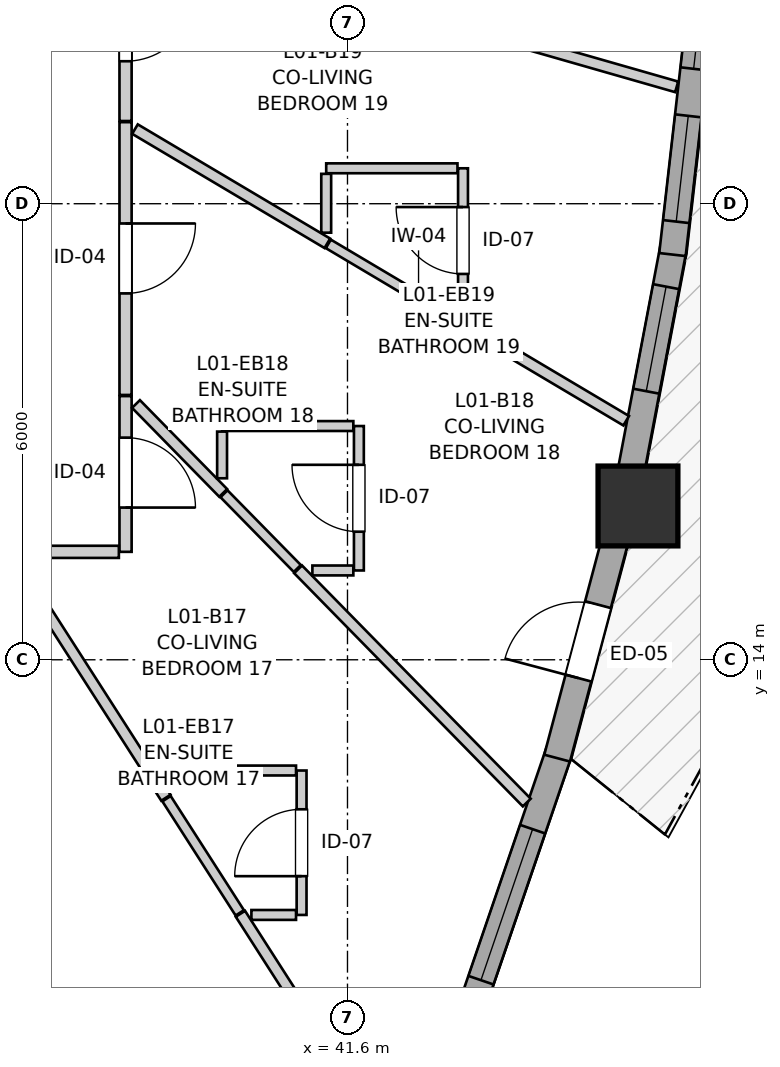
"""IFC4 building model, lengths in metres.
Left out: names, types, materials, properties, quantities, classifications, styles, units other than length and angle.
Written with IfcOpenShell. Run it as: python <this file> out.ifc"""

import sys

from ifc_helpers import new_model, si_unit, direction, frame, frame_2d, origin, origin_2d, place, context, subcontext, project, spatial, rectangle, extrude, source, transform, mapped, element, fill, save


model = new_model("IFC4")
c1 = context("Model", 3, precision=1e-05, world=origin(), true_north=direction((0.0, 1.0)))
c2 = subcontext(c1, "Body", "Model", "MODEL_VIEW")
j1 = project(units=[si_unit("LENGTHUNIT", "METRE"), si_unit("PLANEANGLEUNIT", "RADIAN")], contexts=[c1])
p1 = place(None, origin())
s1 = spatial("IfcSite", under=j1, at=p1, CompositionType="ELEMENT")
p2 = place(p1, origin())
s2 = spatial("IfcBuilding", under=s1, at=p2, CompositionType="ELEMENT")
p3 = place(p2, frame((0.0, 0.0, 7.8)))
s3 = spatial("IfcBuildingStorey", under=s2, at=p3, CompositionType="ELEMENT", Elevation=7.8)
m1 = source(origin(), c2, "Body", "SweptSolid", [
    extrude(rectangle(XDim=1.05, YDim=1.05, at=origin_2d()), origin(), (0.0, 0.0, 1.0), 2.94),
])
p4 = place(p3, frame((45.422, 16.023, 0.0), z_axis=(0.0, 0.0, 1.0), x_axis=(1.0, 0.0, 0.0)))
e1 = element("IfcColumn", 1, at=p4, inside=s3, PredefinedType="COLUMN", context=c2, shape_type="MappedRepresentation", body=[
    mapped(m1, transform((0.0, 0.0, 0.0), x_axis=(1.0, 0.0, 0.0), y_axis=(0.0, 1.0, 0.0), z_axis=(0.0, 0.0, 1.0), scale=1.0)),
])
p5 = place(p3, frame((43.241, 9.448, 0.0), z_axis=(0.0, 0.0, 1.0), x_axis=(0.323599751171, 0.946194060984, 0.0)))
e2 = element("IfcWall", 2, at=p5, inside=s3, PredefinedType="SOLIDWALL", context=c2, shape_type="SweptSolid", body=[
    extrude(rectangle(XDim=3.532, YDim=0.35, at=frame_2d((1.766, 0.0))), origin(), (0.0, 0.0, 1.0), 2.42),
])
p6 = place(p5, frame((0.356, 0.0, 0.82)))
e3 = element("IfcOpeningElement", 3, at=p6, cuts=e2, PredefinedType="OPENING", context=c2, shape_type="SweptSolid", body=[
    extrude(rectangle(XDim=2.1, YDim=1.4, at=frame_2d((1.05, 0.7))), frame((0.0, 0.185, 0.0), z_axis=(0.0, -1.0, 0.0), x_axis=(1.0, 0.0, 0.0)), (0.0, 0.0, 1.0), 0.37),
])
p7 = place(p3, frame((44.358, 12.706, 0.0), z_axis=(0.0, 0.0, 1.0), x_axis=(0.25708907847, 0.966387709841, 0.0)))
e4 = element("IfcWall", 4, at=p7, inside=s3, PredefinedType="SOLIDWALL", context=c2, shape_type="SweptSolid", body=[
    extrude(rectangle(XDim=3.179, YDim=0.35, at=frame_2d((1.59, 0.0))), origin(), (0.0, 0.0, 1.0), 2.42),
])
p8 = place(p7, frame((1.09, 0.0, 0.0)))
e5 = element("IfcOpeningElement", 5, at=p8, cuts=e4, PredefinedType="OPENING", context=c2, shape_type="SweptSolid", body=[
    extrude(rectangle(XDim=1.0, YDim=2.1, at=frame_2d((0.5, 1.05))), frame((0.0, 0.185, 0.0), z_axis=(0.0, -1.0, 0.0), x_axis=(1.0, 0.0, 0.0)), (0.0, 0.0, 1.0), 0.37),
])
p9 = place(p3, frame((45.306, 16.351, 0.0), z_axis=(0.0, 0.0, 1.0), x_axis=(0.186681017514, 0.982420580861, 0.0)))
e6 = element("IfcWall", 6, at=p9, inside=s3, PredefinedType="SOLIDWALL", context=c2, shape_type="SweptSolid", body=[
    extrude(rectangle(XDim=3.123, YDim=0.35, at=frame_2d((1.562, 0.0))), origin(), (0.0, 0.0, 1.0), 2.42),
])
p10 = place(p9, frame((1.204, 0.0, 0.82)))
e7 = element("IfcOpeningElement", 7, at=p10, cuts=e6, PredefinedType="OPENING", context=c2, shape_type="SweptSolid", body=[
    extrude(rectangle(XDim=1.4, YDim=1.35, at=frame_2d((0.7, 0.675))), frame((0.0, 0.185, 0.0), z_axis=(0.0, -1.0, 0.0), x_axis=(1.0, 0.0, 0.0)), (0.0, 0.0, 1.0), 0.37),
])
p11 = place(p3, frame((45.875, 19.331, 0.0), z_axis=(0.0, 0.0, 1.0), x_axis=(0.113329685842, 0.99355743785, 0.0)))
e8 = element("IfcWall", 8, at=p11, inside=s3, PredefinedType="SOLIDWALL", context=c2, shape_type="SweptSolid", body=[
    extrude(rectangle(XDim=3.365, YDim=0.35, at=frame_2d((1.683, 0.0))), origin(), (0.0, 0.0, 1.0), 2.42),
])
p12 = place(p11, frame((0.437, 0.0, 0.82)))
e9 = element("IfcOpeningElement", 9, at=p12, cuts=e8, PredefinedType="OPENING", context=c2, shape_type="SweptSolid", body=[
    extrude(rectangle(XDim=1.4, YDim=1.35, at=frame_2d((0.7, 0.675))), frame((0.0, 0.185, 0.0), z_axis=(0.0, -1.0, 0.0), x_axis=(1.0, 0.0, 0.0)), (0.0, 0.0, 1.0), 0.37),
])
p13 = place(p11, frame((2.459, 0.0, 0.82)))
e10 = element("IfcOpeningElement", 10, at=p13, cuts=e8, PredefinedType="OPENING", context=c2, shape_type="SweptSolid", body=[
    extrude(rectangle(XDim=0.58, YDim=1.35, at=frame_2d((0.29, 0.675))), frame((0.0, 0.185, 0.0), z_axis=(0.0, -1.0, 0.0), x_axis=(1.0, 0.0, 0.0)), (0.0, 0.0, 1.0), 0.37),
])
p14 = place(p3, frame((38.68, 21.073, 0.0), z_axis=(0.0, 0.0, 1.0), x_axis=(0.0, -1.0, 0.0)))
e11 = element("IfcWall", 11, at=p14, inside=s3, PredefinedType="PARTITIONING", context=c2, shape_type="SweptSolid", body=[
    extrude(rectangle(XDim=3.589, YDim=0.16, at=frame_2d((1.794, 0.0))), origin(), (0.0, 0.0, 1.0), 2.94),
])
p15 = place(p14, frame((1.333, 0.0, 0.0)))
e12 = element("IfcOpeningElement", 12, at=p15, cuts=e11, PredefinedType="OPENING", context=c2, shape_type="SweptSolid", body=[
    extrude(rectangle(XDim=0.92, YDim=2.1, at=frame_2d((0.46, 1.05))), frame((0.0, 0.09, 0.0), z_axis=(0.0, -1.0, 0.0), x_axis=(1.0, 0.0, 0.0)), (0.0, 0.0, 1.0), 0.18),
])
p16 = place(p3, frame((38.68, 23.63, 0.0), z_axis=(0.0, 0.0, 1.0), x_axis=(0.0, -1.0, 0.0)))
e13 = element("IfcWall", 13, at=p16, inside=s3, PredefinedType="PARTITIONING", context=c2, shape_type="SweptSolid", body=[
    extrude(rectangle(XDim=2.542, YDim=0.16, at=frame_2d((1.271, 0.0))), origin(), (0.0, 0.0, 1.0), 2.94),
])
p17 = place(p16, frame((0.835, 0.0, 0.0)))
e14 = element("IfcOpeningElement", 14, at=p17, cuts=e13, PredefinedType="OPENING", context=c2, shape_type="SweptSolid", body=[
    extrude(rectangle(XDim=0.92, YDim=2.1, at=frame_2d((0.46, 1.05))), frame((0.0, 0.09, 0.0), z_axis=(0.0, -1.0, 0.0), x_axis=(1.0, 0.0, 0.0)), (0.0, 0.0, 1.0), 0.18),
])
p18 = place(p3, frame((38.68, 17.469, 0.0), z_axis=(0.0, 0.0, 1.0), x_axis=(0.0, -1.0, 0.0)))
e15 = element("IfcWall", 15, at=p18, inside=s3, PredefinedType="PARTITIONING", context=c2, shape_type="SweptSolid", body=[
    extrude(rectangle(XDim=2.049, YDim=0.16, at=frame_2d((1.024, 0.0))), origin(), (0.0, 0.0, 1.0), 2.94),
])
p19 = place(p18, frame((0.546, 0.0, 0.0)))
e16 = element("IfcOpeningElement", 16, at=p19, cuts=e15, PredefinedType="OPENING", context=c2, shape_type="SweptSolid", body=[
    extrude(rectangle(XDim=0.92, YDim=2.1, at=frame_2d((0.46, 1.05))), frame((0.0, 0.09, 0.0), z_axis=(0.0, -1.0, 0.0), x_axis=(1.0, 0.0, 0.0)), (0.0, 0.0, 1.0), 0.18),
])
p20 = place(p3, frame((43.12, 18.566, 0.0), z_axis=(0.0, 0.0, 1.0), x_axis=(0.0, 1.0, 0.0)))
e17 = element("IfcWall", 17, at=p20, inside=s3, PredefinedType="PARTITIONING", context=c2, shape_type="SweptSolid", body=[
    extrude(rectangle(XDim=1.9, YDim=0.13, at=frame_2d((0.95, 0.0))), origin(), (0.0, 0.0, 1.0), 2.94),
])
p21 = place(p20, frame((0.51, 0.0, 0.0)))
e18 = element("IfcOpeningElement", 18, at=p21, cuts=e17, PredefinedType="OPENING", context=c2, shape_type="SweptSolid", body=[
    extrude(rectangle(XDim=0.88, YDim=2.05, at=frame_2d((0.44, 1.025))), frame((0.0, 0.075, 0.0), z_axis=(0.0, -1.0, 0.0), x_axis=(1.0, 0.0, 0.0)), (0.0, 0.0, 1.0), 0.15),
])
p22 = place(p3, frame((40.996, 10.643, 0.0), z_axis=(0.0, 0.0, 1.0), x_axis=(0.0, 1.0, 0.0)))
e19 = element("IfcWall", 19, at=p22, inside=s3, PredefinedType="PARTITIONING", context=c2, shape_type="SweptSolid", body=[
    extrude(rectangle(XDim=1.9, YDim=0.13, at=frame_2d((0.95, 0.0))), origin(), (0.0, 0.0, 1.0), 2.94),
])
p23 = place(p22, frame((0.51, 0.0, 0.0)))
e20 = element("IfcOpeningElement", 20, at=p23, cuts=e19, PredefinedType="OPENING", context=c2, shape_type="SweptSolid", body=[
    extrude(rectangle(XDim=0.88, YDim=2.05, at=frame_2d((0.44, 1.025))), frame((0.0, 0.075, 0.0), z_axis=(0.0, -1.0, 0.0), x_axis=(1.0, 0.0, 0.0)), (0.0, 0.0, 1.0), 0.15),
])
p24 = place(p3, frame((41.75, 15.175, 0.0), z_axis=(0.0, 0.0, 1.0), x_axis=(0.0, 1.0, 0.0)))
e21 = element("IfcWall", 21, at=p24, inside=s3, PredefinedType="PARTITIONING", context=c2, shape_type="SweptSolid", body=[
    extrude(rectangle(XDim=1.9, YDim=0.13, at=frame_2d((0.95, 0.0))), origin(), (0.0, 0.0, 1.0), 2.94),
])
p25 = place(p24, frame((0.51, 0.0, 0.0)))
e22 = element("IfcOpeningElement", 22, at=p25, cuts=e21, PredefinedType="OPENING", context=c2, shape_type="SweptSolid", body=[
    extrude(rectangle(XDim=0.88, YDim=2.05, at=frame_2d((0.44, 1.025))), frame((0.0, 0.075, 0.0), z_axis=(0.0, -1.0, 0.0), x_axis=(1.0, 0.0, 0.0)), (0.0, 0.0, 1.0), 0.15),
])
p26 = place(p3, frame((40.95, 15.19, 0.0), z_axis=(0.0, 0.0, 1.0), x_axis=(0.700142401903, -0.714003233226, 0.0)))
e23 = element("IfcWall", 23, at=p26, inside=s3, PredefinedType="PARTITIONING", context=c2, shape_type="SweptSolid", body=[
    extrude(rectangle(XDim=4.298, YDim=0.145, at=frame_2d((2.149, 0.0))), origin(), (0.0, 0.0, 1.0), 2.94),
])
p27 = place(p3, frame((40.191, 10.658, 0.0), z_axis=(0.0, 0.0, 1.0), x_axis=(0.539757550566, -0.841820519236, 0.0)))
e24 = element("IfcWall", 24, at=p27, inside=s3, PredefinedType="PARTITIONING", context=c2, shape_type="SweptSolid", body=[
    extrude(rectangle(XDim=4.221, YDim=0.145, at=frame_2d((2.111, 0.0))), origin(), (0.0, 0.0, 1.0), 2.94),
])
p28 = place(p3, frame((37.217, 15.294, 0.0), z_axis=(0.0, 0.0, 1.0), x_axis=(0.539878709929, -0.841742822105, 0.0)))
e25 = element("IfcWall", 25, at=p28, inside=s3, PredefinedType="PARTITIONING", context=c2, shape_type="SweptSolid", body=[
    extrude(rectangle(XDim=3.694, YDim=0.145, at=frame_2d((1.847, 0.0))), origin(), (0.0, 0.0, 1.0), 2.94),
])
p29 = place(p3, frame((38.804, 20.981, 0.0), z_axis=(0.0, 0.0, 1.0), x_axis=(0.859905944731, -0.510452511225, 0.0)))
e26 = element("IfcWall", 26, at=p29, inside=s3, PredefinedType="PARTITIONING", context=c2, shape_type="SweptSolid", body=[
    extrude(rectangle(XDim=2.943, YDim=0.145, at=frame_2d((1.472, 0.0))), origin(), (0.0, 0.0, 1.0), 2.94),
])
p30 = place(p3, frame((43.055, 22.361, 0.0), z_axis=(0.0, 0.0, 1.0), x_axis=(0.961351316588, -0.275324619486, 0.0)))
e27 = element("IfcWall", 27, at=p30, inside=s3, PredefinedType="PARTITIONING", context=c2, shape_type="SweptSolid", body=[
    extrude(rectangle(XDim=2.992, YDim=0.145, at=frame_2d((1.496, 0.0))), origin(), (0.0, 0.0, 1.0), 2.94),
])
p31 = place(p3, frame((42.848, 18.581, 0.0), z_axis=(0.0, 0.0, 1.0), x_axis=(0.859872599939, -0.510508679528, 0.0)))
e28 = element("IfcWall", 28, at=p31, inside=s3, PredefinedType="PARTITIONING", context=c2, shape_type="SweptSolid", body=[
    extrude(rectangle(XDim=2.813, YDim=0.145, at=frame_2d((1.407, 0.0))), origin(), (0.0, 0.0, 1.0), 2.94),
])
p32 = place(p3, frame((38.817, 17.365, 0.0), z_axis=(0.0, 0.0, 1.0), x_axis=(0.70029627305, -0.713852316626, 0.0)))
e29 = element("IfcWall", 29, at=p32, inside=s3, PredefinedType="PARTITIONING", context=c2, shape_type="SweptSolid", body=[
    extrude(rectangle(XDim=1.639, YDim=0.145, at=frame_2d((0.819, 0.0))), origin(), (0.0, 0.0, 1.0), 2.94),
])
for number, where, z_axis, x_axis in (
    (30, (39.196, 12.543, 0.0), (0.0, 0.0, 1.0), (1.0, 0.0, 0.0)),
    (31, (39.95, 17.075, 0.0), (0.0, 0.0, 1.0), (1.0, 0.0, 0.0)),
    (32, (41.32, 20.466, 0.0), (0.0, 0.0, 1.0), (1.0, 0.0, 0.0)),
):
    element("IfcWall", number, at=place(p3, frame(where, z_axis=z_axis, x_axis=x_axis)), inside=s3, PredefinedType="PARTITIONING", context=c2, shape_type="SweptSolid", body=[
        extrude(rectangle(XDim=1.727, YDim=0.13, at=frame_2d((0.864, 0.0))), origin(), (0.0, 0.0, 1.0), 2.94),
    ])
p33 = place(p3, frame((39.219, 12.172, 0.0), z_axis=(0.0, 0.0, 1.0), x_axis=(0.539899826285, -0.84172927808, 0.0)))
e33 = element("IfcWall", 33, at=p33, inside=s3, PredefinedType="PARTITIONING", context=c2, shape_type="SweptSolid", body=[
    extrude(rectangle(XDim=1.784, YDim=0.13, at=frame_2d((0.892, 0.0))), origin(), (0.0, 0.0, 1.0), 2.94),
])
p34 = place(p3, frame((41.348, 19.471, 0.0), z_axis=(0.0, 0.0, 1.0), x_axis=(0.859825694404, -0.510587676352, 0.0)))
e34 = element("IfcWall", 34, at=p34, inside=s3, PredefinedType="PARTITIONING", context=c2, shape_type="SweptSolid", body=[
    extrude(rectangle(XDim=1.729, YDim=0.13, at=frame_2d((0.865, 0.0))), origin(), (0.0, 0.0, 1.0), 2.94),
])
p35 = place(p3, frame((37.314, 15.42, 0.0), z_axis=(0.0, 0.0, 1.0), x_axis=(1.0, 0.0, 0.0)))
e35 = element("IfcWall", 35, at=p35, inside=s3, PredefinedType="PARTITIONING", context=c2, shape_type="SweptSolid", body=[
    extrude(rectangle(XDim=1.278, YDim=0.16, at=frame_2d((0.639, 0.0))), origin(), (0.0, 0.0, 1.0), 2.94),
])
p36 = place(p3, frame((39.975, 16.184, 0.0), z_axis=(0.0, 0.0, 1.0), x_axis=(0.700338966049, -0.713810431861, 0.0)))
e36 = element("IfcWall", 36, at=p36, inside=s3, PredefinedType="PARTITIONING", context=c2, shape_type="SweptSolid", body=[
    extrude(rectangle(XDim=1.377, YDim=0.13, at=frame_2d((0.689, 0.0))), origin(), (0.0, 0.0, 1.0), 2.94),
])
p37 = place(p3, frame((41.32, 19.619, 0.0), z_axis=(0.0, 0.0, 1.0), x_axis=(0.0, 1.0, 0.0)))
e37 = element("IfcWall", 37, at=p37, inside=s3, PredefinedType="PARTITIONING", context=c2, shape_type="SweptSolid", body=[
    extrude(rectangle(XDim=0.774, YDim=0.13, at=frame_2d((0.387, 0.0))), origin(), (0.0, 0.0, 1.0), 2.94),
])
p38 = place(p3, frame((39.95, 16.388, 0.0), z_axis=(0.0, 0.0, 1.0), x_axis=(0.0, 1.0, 0.0)))
e38 = element("IfcWall", 38, at=p38, inside=s3, PredefinedType="PARTITIONING", context=c2, shape_type="SweptSolid", body=[
    extrude(rectangle(XDim=0.614, YDim=0.13, at=frame_2d((0.307, 0.0))), origin(), (0.0, 0.0, 1.0), 2.94),
])
p39 = place(p3, frame((40.336, 10.643, 0.0), z_axis=(0.0, 0.0, 1.0), x_axis=(1.0, 0.0, 0.0)))
e39 = element("IfcWall", 39, at=p39, inside=s3, PredefinedType="PARTITIONING", context=c2, shape_type="SweptSolid", body=[
    extrude(rectangle(XDim=0.587, YDim=0.13, at=frame_2d((0.294, 0.0))), origin(), (0.0, 0.0, 1.0), 2.94),
])
p40 = place(p3, frame((41.138, 15.175, 0.0), z_axis=(0.0, 0.0, 1.0), x_axis=(1.0, 0.0, 0.0)))
e40 = element("IfcWall", 40, at=p40, inside=s3, PredefinedType="PARTITIONING", context=c2, shape_type="SweptSolid", body=[
    extrude(rectangle(XDim=0.539, YDim=0.13, at=frame_2d((0.27, 0.0))), origin(), (0.0, 0.0, 1.0), 2.94),
])
m2 = source(origin(), c2, "Body", "SweptSolid", [
    extrude(rectangle(XDim=2.1, YDim=1.4, at=frame_2d((1.05, 0.7))), frame((0.0, 0.03, 0.0), z_axis=(0.0, -1.0, 0.0), x_axis=(1.0, 0.0, 0.0)), (0.0, 0.0, 1.0), 0.06),
])
p41 = place(p6, origin())
e41 = element("IfcWindow", 41, at=p41, inside=s3, PartitioningType="SINGLE_PANEL", PredefinedType="WINDOW", context=c2, shape_type="MappedRepresentation", body=[
    mapped(m2, transform((0.0, 0.0, 0.0), x_axis=(1.0, 0.0, 0.0), y_axis=(0.0, 1.0, 0.0), z_axis=(0.0, 0.0, 1.0), scale=1.0)),
])
fill(e3, e41)
m3 = source(origin(), c2, "Body", "SweptSolid", [
    extrude(rectangle(XDim=1.4, YDim=1.35, at=frame_2d((0.7, 0.675))), frame((0.0, 0.03, 0.0), z_axis=(0.0, -1.0, 0.0), x_axis=(1.0, 0.0, 0.0)), (0.0, 0.0, 1.0), 0.06),
])
p42 = place(p10, origin())
e42 = element("IfcWindow", 42, at=p42, inside=s3, PartitioningType="SINGLE_PANEL", PredefinedType="WINDOW", context=c2, shape_type="MappedRepresentation", body=[
    mapped(m3, transform((0.0, 0.0, 0.0), x_axis=(1.0, 0.0, 0.0), y_axis=(0.0, 1.0, 0.0), z_axis=(0.0, 0.0, 1.0), scale=1.0)),
])
fill(e7, e42)
p43 = place(p12, origin())
e43 = element("IfcWindow", 43, at=p43, inside=s3, PartitioningType="SINGLE_PANEL", PredefinedType="WINDOW", context=c2, shape_type="MappedRepresentation", body=[
    mapped(m3, transform((0.0, 0.0, 0.0), x_axis=(1.0, 0.0, 0.0), y_axis=(0.0, 1.0, 0.0), z_axis=(0.0, 0.0, 1.0), scale=1.0)),
])
fill(e9, e43)
m4 = source(origin(), c2, "Body", "SweptSolid", [
    extrude(rectangle(XDim=0.58, YDim=1.35, at=frame_2d((0.29, 0.675))), frame((0.0, 0.03, 0.0), z_axis=(0.0, -1.0, 0.0), x_axis=(1.0, 0.0, 0.0)), (0.0, 0.0, 1.0), 0.06),
])
p44 = place(p13, origin())
e44 = element("IfcWindow", 44, at=p44, inside=s3, PartitioningType="SINGLE_PANEL", PredefinedType="WINDOW", context=c2, shape_type="MappedRepresentation", body=[
    mapped(m4, transform((0.0, 0.0, 0.0), x_axis=(1.0, 0.0, 0.0), y_axis=(0.0, 1.0, 0.0), z_axis=(0.0, 0.0, 1.0), scale=1.0)),
])
fill(e10, e44)
m5 = source(origin(), c2, "Body", "SweptSolid", [
    extrude(rectangle(XDim=1.0, YDim=2.1, at=frame_2d((0.5, 1.05))), frame((0.0, 0.025, 0.0), z_axis=(0.0, -1.0, 0.0), x_axis=(1.0, 0.0, 0.0)), (0.0, 0.0, 1.0), 0.05),
])
p45 = place(p8, origin())
e45 = element("IfcDoor", 45, at=p45, inside=s3, OperationType="SINGLE_SWING_LEFT", PredefinedType="DOOR", context=c2, shape_type="MappedRepresentation", body=[
    mapped(m5, transform((0.0, 0.0, 0.0), x_axis=(1.0, 0.0, 0.0), y_axis=(0.0, 1.0, 0.0), z_axis=(0.0, 0.0, 1.0), scale=1.0)),
])
fill(e5, e45)
m6 = source(origin(), c2, "Body", "SweptSolid", [
    extrude(rectangle(XDim=0.92, YDim=2.1, at=frame_2d((0.46, 1.05))), frame((0.0, 0.025, 0.0), z_axis=(0.0, -1.0, 0.0), x_axis=(1.0, 0.0, 0.0)), (0.0, 0.0, 1.0), 0.05),
])
p46 = place(p15, origin())
e46 = element("IfcDoor", 46, at=p46, inside=s3, OperationType="SINGLE_SWING_LEFT", PredefinedType="DOOR", context=c2, shape_type="MappedRepresentation", body=[
    mapped(m6, transform((0.0, 0.0, 0.0), x_axis=(1.0, 0.0, 0.0), y_axis=(0.0, 1.0, 0.0), z_axis=(0.0, 0.0, 1.0), scale=1.0)),
])
fill(e12, e46)
p47 = place(p17, origin())
e47 = element("IfcDoor", 47, at=p47, inside=s3, OperationType="SINGLE_SWING_LEFT", PredefinedType="DOOR", context=c2, shape_type="MappedRepresentation", body=[
    mapped(m6, transform((0.0, 0.0, 0.0), x_axis=(1.0, 0.0, 0.0), y_axis=(0.0, 1.0, 0.0), z_axis=(0.0, 0.0, 1.0), scale=1.0)),
])
fill(e14, e47)
p48 = place(p19, origin())
e48 = element("IfcDoor", 48, at=p48, inside=s3, OperationType="SINGLE_SWING_RIGHT", PredefinedType="DOOR", context=c2, shape_type="MappedRepresentation", body=[
    mapped(m6, transform((0.0, 0.0, 0.0), x_axis=(1.0, 0.0, 0.0), y_axis=(0.0, 1.0, 0.0), z_axis=(0.0, 0.0, 1.0), scale=1.0)),
])
fill(e16, e48)
m7 = source(origin(), c2, "Body", "SweptSolid", [
    extrude(rectangle(XDim=0.88, YDim=2.05, at=frame_2d((0.44, 1.025))), frame((0.0, 0.025, 0.0), z_axis=(0.0, -1.0, 0.0), x_axis=(1.0, 0.0, 0.0)), (0.0, 0.0, 1.0), 0.05),
])
p49 = place(p21, origin())
e49 = element("IfcDoor", 49, at=p49, inside=s3, OperationType="SINGLE_SWING_RIGHT", PredefinedType="DOOR", context=c2, shape_type="MappedRepresentation", body=[
    mapped(m7, transform((0.0, 0.0, 0.0), x_axis=(1.0, 0.0, 0.0), y_axis=(0.0, 1.0, 0.0), z_axis=(0.0, 0.0, 1.0), scale=1.0)),
])
fill(e18, e49)
p50 = place(p23, origin())
e50 = element("IfcDoor", 50, at=p50, inside=s3, OperationType="SINGLE_SWING_LEFT", PredefinedType="DOOR", context=c2, shape_type="MappedRepresentation", body=[
    mapped(m7, transform((0.0, 0.0, 0.0), x_axis=(1.0, 0.0, 0.0), y_axis=(0.0, 1.0, 0.0), z_axis=(0.0, 0.0, 1.0), scale=1.0)),
])
fill(e20, e50)
p51 = place(p25, origin())
e51 = element("IfcDoor", 51, at=p51, inside=s3, OperationType="SINGLE_SWING_RIGHT", PredefinedType="DOOR", context=c2, shape_type="MappedRepresentation", body=[
    mapped(m7, transform((0.0, 0.0, 0.0), x_axis=(1.0, 0.0, 0.0), y_axis=(0.0, 1.0, 0.0), z_axis=(0.0, 0.0, 1.0), scale=1.0)),
])
fill(e22, e51)
save(model, sys.argv[1])
